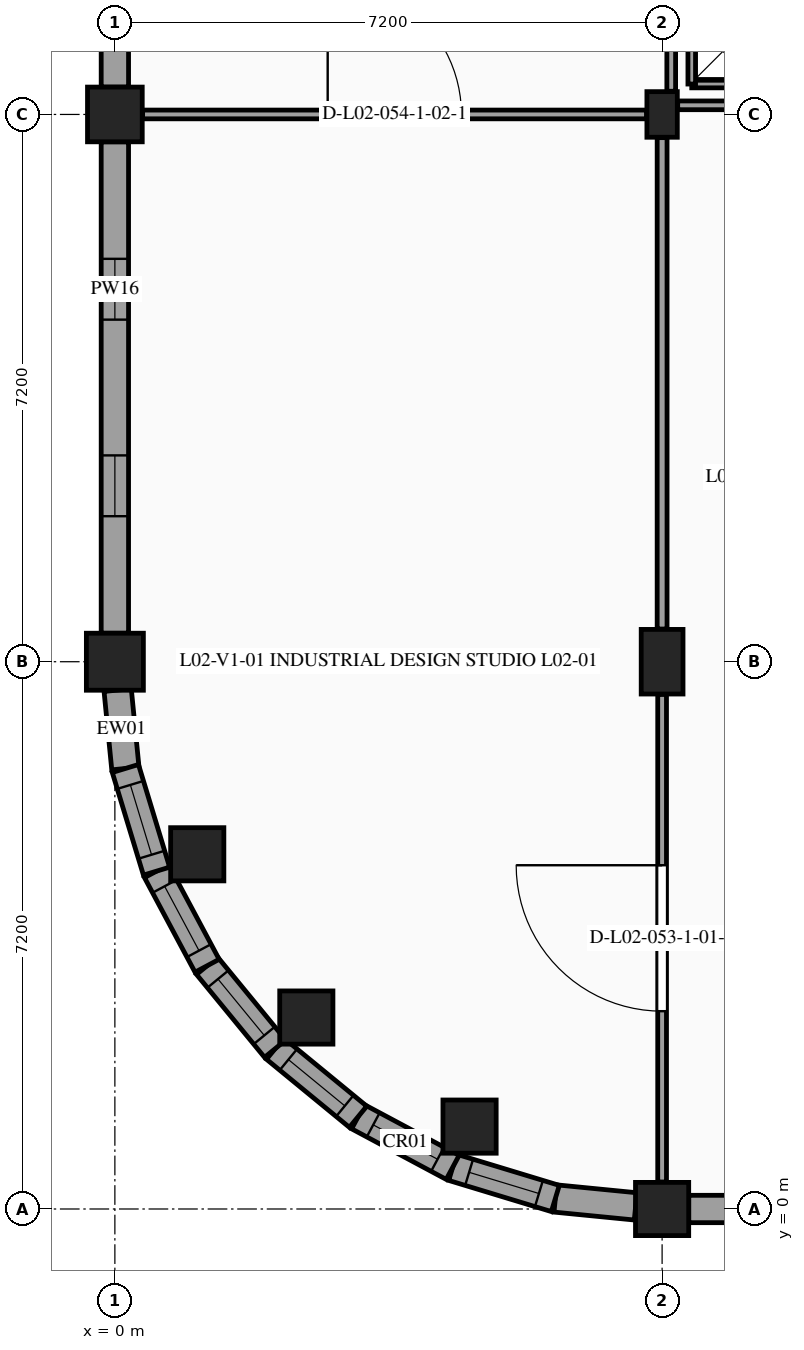
"""IFC4 building model, lengths in metres.
Left out: names, types, materials, properties, quantities, classifications, styles, units other than length and angle.
Written with IfcOpenShell. Run it as: python <this file> out.ifc"""

import sys

from ifc_helpers import new_model, si_unit, direction, frame, frame_2d, origin, origin_2d, place, context, subcontext, project, spatial, rectangle, circle, extrude, element, fill, save


model = new_model("IFC4")
c1 = context("Model", 3, precision=1e-05, world=origin(), true_north=direction((0.0, 1.0)))
c2 = subcontext(c1, "Body", "Model", "MODEL_VIEW")
j1 = project(units=[si_unit("LENGTHUNIT", "METRE"), si_unit("PLANEANGLEUNIT", "RADIAN")], contexts=[c1])
p1 = place(None, origin())
s1 = spatial("IfcSite", under=j1, at=p1, CompositionType="ELEMENT")
p2 = place(p1, origin())
s2 = spatial("IfcBuilding", under=s1, at=p2, CompositionType="ELEMENT")
p3 = place(p2, frame((0.0, 0.0, 9.9)))
s3 = spatial("IfcBuildingStorey", under=s2, at=p3, CompositionType="ELEMENT", Elevation=9.9)
p4 = place(p3, frame((0.0, 7.2, 0.0), z_axis=(0.0, 0.0, 1.0), x_axis=(1.0, 0.0, 0.0)))
e1 = element("IfcColumn", 1, at=p4, inside=s3, PredefinedType="COLUMN", context=c2, shape_type="SweptSolid", body=[
    extrude(rectangle(XDim=0.75, YDim=0.75, at=origin_2d()), origin(), (0.0, 0.0, 1.0), 4.5),
])
p5 = place(p3, frame((0.0, 14.4, 0.0), z_axis=(0.0, 0.0, 1.0), x_axis=(1.0, 0.0, 0.0)))
e2 = element("IfcColumn", 2, at=p5, inside=s3, PredefinedType="COLUMN", context=c2, shape_type="SweptSolid", body=[
    extrude(rectangle(XDim=0.72, YDim=0.72, at=origin_2d()), origin(), (0.0, 0.0, 1.0), 4.5),
])
p6 = place(p3, frame((7.2, 0.0, 0.0), z_axis=(0.0, 0.0, 1.0), x_axis=(1.0, 0.0, 0.0)))
e3 = element("IfcColumn", 3, at=p6, inside=s3, PredefinedType="COLUMN", context=c2, shape_type="SweptSolid", body=[
    extrude(rectangle(XDim=0.7, YDim=0.7, at=origin_2d()), origin(), (0.0, 0.0, 1.0), 4.5),
])
p7 = place(p3, frame((7.2, 7.2, 0.0), z_axis=(0.0, 0.0, 1.0), x_axis=(1.0, 0.0, 0.0)))
e4 = element("IfcColumn", 4, at=p7, inside=s3, PredefinedType="COLUMN", context=c2, shape_type="SweptSolid", body=[
    extrude(rectangle(XDim=0.55, YDim=0.85, at=origin_2d()), origin(), (0.0, 0.0, 1.0), 4.5),
])
p8 = place(p3, frame((7.2, 14.4, 0.0), z_axis=(0.0, 0.0, 1.0), x_axis=(1.0, 0.0, 0.0)))
e5 = element("IfcColumn", 5, at=p8, inside=s3, PredefinedType="PILASTER", context=c2, shape_type="SweptSolid", body=[
    extrude(rectangle(XDim=0.4, YDim=0.6, at=origin_2d()), origin(), (0.0, 0.0, 1.0), 4.5),
])
for number, where, z_axis, x_axis in (
    (6, (1.084, 4.667, 0.0), (0.0, 0.0, 1.0), (1.0, 0.0, 0.0)),
    (7, (2.519, 2.519, 0.0), (0.0, 0.0, 1.0), (1.0, 0.0, 0.0)),
    (8, (4.667, 1.084, 0.0), (0.0, 0.0, 1.0), (1.0, 0.0, 0.0)),
):
    element("IfcColumn", number, at=place(p3, frame(where, z_axis=z_axis, x_axis=x_axis)), inside=s3, PredefinedType="COLUMN", context=c2, shape_type="SweptSolid", body=[
        extrude(circle(Radius=0.35, at=origin_2d()), origin(), (0.0, 0.0, 1.0), 4.5),
    ])
p9 = place(p3, frame((0.138, 5.795, 0.0), z_axis=(0.0, 0.0, 1.0), x_axis=(-0.097987704654, 0.995187625394, 0.0)))
e9 = element("IfcWall", 9, at=p9, inside=s3, PredefinedType="STANDARD", context=c2, shape_type="SweptSolid", body=[
    extrude(rectangle(XDim=1.036, YDim=0.36, at=frame_2d((0.518, 0.0))), origin(), (0.0, 0.0, 1.0), 4.225),
])
p10 = place(p3, frame((0.0, 7.575, 0.0), z_axis=(0.0, 0.0, 1.0), x_axis=(0.0, 1.0, 0.0)))
e10 = element("IfcWall", 10, at=p10, inside=s3, PredefinedType="STANDARD", context=c2, shape_type="SweptSolid", body=[
    extrude(rectangle(XDim=6.465, YDim=0.36, at=frame_2d((3.232, 0.0))), origin(), (0.0, 0.0, 1.0), 3.47),
])
p11 = place(p10, frame((1.54, 0.0, 1.15)))
e11 = element("IfcOpeningElement", 11, at=p11, cuts=e10, PredefinedType="OPENING", context=c2, shape_type="SweptSolid", body=[
    extrude(rectangle(XDim=0.8, YDim=1.5, at=frame_2d((0.4, 0.75))), frame((0.0, 0.19, 0.0), z_axis=(0.0, -1.0, 0.0), x_axis=(1.0, 0.0, 0.0)), (0.0, 0.0, 1.0), 0.38),
])
p12 = place(p10, frame((4.125, 0.0, 1.15)))
e12 = element("IfcOpeningElement", 12, at=p12, cuts=e10, PredefinedType="OPENING", context=c2, shape_type="SweptSolid", body=[
    extrude(rectangle(XDim=0.8, YDim=1.5, at=frame_2d((0.4, 0.75))), frame((0.0, 0.19, 0.0), z_axis=(0.0, -1.0, 0.0), x_axis=(1.0, 0.0, 0.0)), (0.0, 0.0, 1.0), 0.38),
])
p13 = place(p3, frame((0.0, 14.76, 0.0), z_axis=(0.0, 0.0, 1.0), x_axis=(0.0, 1.0, 0.0)))
e13 = element("IfcWall", 13, at=p13, inside=s3, PredefinedType="STANDARD", context=c2, shape_type="SweptSolid", body=[
    extrude(rectangle(XDim=6.49, YDim=0.36, at=frame_2d((3.245, 0.0))), origin(), (0.0, 0.0, 1.0), 3.47),
])
p14 = place(p13, frame((0.972, 0.0, 1.15)))
e14 = element("IfcOpeningElement", 14, at=p14, cuts=e13, PredefinedType="OPENING", context=c2, shape_type="SweptSolid", body=[
    extrude(rectangle(XDim=1.95, YDim=1.4, at=frame_2d((0.975, 0.7))), frame((0.0, 0.19, 0.0), z_axis=(0.0, -1.0, 0.0), x_axis=(1.0, 0.0, 0.0)), (0.0, 0.0, 1.0), 0.38),
])
p15 = place(p13, frame((3.568, 0.0, 1.15)))
e15 = element("IfcOpeningElement", 15, at=p15, cuts=e13, PredefinedType="OPENING", context=c2, shape_type="SweptSolid", body=[
    extrude(rectangle(XDim=1.95, YDim=1.4, at=frame_2d((0.975, 0.7))), frame((0.0, 0.19, 0.0), z_axis=(0.0, -1.0, 0.0), x_axis=(1.0, 0.0, 0.0)), (0.0, 0.0, 1.0), 0.38),
])
p16 = place(p3, frame((14.01, 0.0, 0.0), z_axis=(0.0, 0.0, 1.0), x_axis=(-1.0, 0.0, 0.0)))
e16 = element("IfcWall", 16, at=p16, inside=s3, PredefinedType="STANDARD", context=c2, shape_type="SweptSolid", body=[
    extrude(rectangle(XDim=6.46, YDim=0.36, at=frame_2d((3.23, 0.0))), origin(), (0.0, 0.0, 1.0), 3.47),
])
p17 = place(p16, frame((1.313, 0.0, 1.15)))
e17 = element("IfcOpeningElement", 17, at=p17, cuts=e16, PredefinedType="OPENING", context=c2, shape_type="SweptSolid", body=[
    extrude(rectangle(XDim=1.25, YDim=1.25, at=frame_2d((0.625, 0.625))), frame((0.0, 0.19, 0.0), z_axis=(0.0, -1.0, 0.0), x_axis=(1.0, 0.0, 0.0)), (0.0, 0.0, 1.0), 0.38),
])
p18 = place(p16, frame((3.897, 0.0, 1.15)))
e18 = element("IfcOpeningElement", 18, at=p18, cuts=e16, PredefinedType="OPENING", context=c2, shape_type="SweptSolid", body=[
    extrude(rectangle(XDim=1.25, YDim=1.25, at=frame_2d((0.625, 0.625))), frame((0.0, 0.19, 0.0), z_axis=(0.0, -1.0, 0.0), x_axis=(1.0, 0.0, 0.0)), (0.0, 0.0, 1.0), 0.38),
])
p19 = place(p3, frame((6.852, 0.034, 0.0), z_axis=(0.0, 0.0, 1.0), x_axis=(-0.995188591484, 0.097977892298, 0.0)))
e19 = element("IfcWall", 19, at=p19, inside=s3, PredefinedType="STANDARD", context=c2, shape_type="SweptSolid", body=[
    extrude(rectangle(XDim=1.062, YDim=0.36, at=frame_2d((0.531, 0.0))), origin(), (0.0, 0.0, 1.0), 4.225),
])
p20 = place(p3, frame((5.795, 0.138, 0.0), z_axis=(0.0, 0.0, 1.0), x_axis=(-0.95696037757, 0.290218599957, 0.0)))
e20 = element("IfcWall", 20, at=p20, inside=s3, PredefinedType="STANDARD", context=c2, shape_type="SweptSolid", body=[
    extrude(rectangle(XDim=1.412, YDim=0.36, at=frame_2d((0.706, 0.0))), origin(), (0.0, 0.0, 1.0), 4.225),
])
p21 = place(p20, frame((0.226, 0.0, 1.0)))
e21 = element("IfcOpeningElement", 21, at=p21, cuts=e20, PredefinedType="OPENING", context=c2, shape_type="SweptSolid", body=[
    extrude(rectangle(XDim=0.96, YDim=1.4, at=frame_2d((0.48, 0.7))), frame((0.0, 0.19, 0.0), z_axis=(0.0, -1.0, 0.0), x_axis=(1.0, 0.0, 0.0)), (0.0, 0.0, 1.0), 0.38),
])
p22 = place(p3, frame((4.445, 0.548, 0.0), z_axis=(0.0, 0.0, 1.0), x_axis=(-0.881916788861, 0.471405109778, 0.0)))
e22 = element("IfcWall", 22, at=p22, inside=s3, PredefinedType="STANDARD", context=c2, shape_type="SweptSolid", body=[
    extrude(rectangle(XDim=1.411, YDim=0.36, at=frame_2d((0.706, 0.0))), origin(), (0.0, 0.0, 1.0), 4.225),
])
p23 = place(p22, frame((0.226, 0.0, 1.0)))
e23 = element("IfcOpeningElement", 23, at=p23, cuts=e22, PredefinedType="OPENING", context=c2, shape_type="SweptSolid", body=[
    extrude(rectangle(XDim=0.96, YDim=1.4, at=frame_2d((0.48, 0.7))), frame((0.0, 0.19, 0.0), z_axis=(0.0, -1.0, 0.0), x_axis=(1.0, 0.0, 0.0)), (0.0, 0.0, 1.0), 0.38),
])
p24 = place(p3, frame((3.2, 1.213, 0.0), z_axis=(0.0, 0.0, 1.0), x_axis=(-0.772977670605, 0.634433227965, 0.0)))
e24 = element("IfcWall", 24, at=p24, inside=s3, PredefinedType="STANDARD", context=c2, shape_type="SweptSolid", body=[
    extrude(rectangle(XDim=1.412, YDim=0.36, at=frame_2d((0.706, 0.0))), origin(), (0.0, 0.0, 1.0), 4.225),
])
p25 = place(p24, frame((0.226, 0.0, 1.0)))
e25 = element("IfcOpeningElement", 25, at=p25, cuts=e24, PredefinedType="OPENING", context=c2, shape_type="SweptSolid", body=[
    extrude(rectangle(XDim=0.96, YDim=1.4, at=frame_2d((0.48, 0.7))), frame((0.0, 0.19, 0.0), z_axis=(0.0, -1.0, 0.0), x_axis=(1.0, 0.0, 0.0)), (0.0, 0.0, 1.0), 0.38),
])
p26 = place(p3, frame((2.109, 2.109, 0.0), z_axis=(0.0, 0.0, 1.0), x_axis=(-0.634433227965, 0.772977670605, 0.0)))
e26 = element("IfcWall", 26, at=p26, inside=s3, PredefinedType="STANDARD", context=c2, shape_type="SweptSolid", body=[
    extrude(rectangle(XDim=1.412, YDim=0.36, at=frame_2d((0.706, 0.0))), origin(), (0.0, 0.0, 1.0), 4.225),
])
p27 = place(p26, frame((0.226, 0.0, 1.0)))
e27 = element("IfcOpeningElement", 27, at=p27, cuts=e26, PredefinedType="OPENING", context=c2, shape_type="SweptSolid", body=[
    extrude(rectangle(XDim=0.96, YDim=1.4, at=frame_2d((0.48, 0.7))), frame((0.0, 0.19, 0.0), z_axis=(0.0, -1.0, 0.0), x_axis=(1.0, 0.0, 0.0)), (0.0, 0.0, 1.0), 0.38),
])
p28 = place(p3, frame((1.213, 3.2, 0.0), z_axis=(0.0, 0.0, 1.0), x_axis=(-0.471405109778, 0.881916788861, 0.0)))
e28 = element("IfcWall", 28, at=p28, inside=s3, PredefinedType="STANDARD", context=c2, shape_type="SweptSolid", body=[
    extrude(rectangle(XDim=1.411, YDim=0.36, at=frame_2d((0.706, 0.0))), origin(), (0.0, 0.0, 1.0), 4.225),
])
p29 = place(p28, frame((0.226, 0.0, 1.0)))
e29 = element("IfcOpeningElement", 29, at=p29, cuts=e28, PredefinedType="OPENING", context=c2, shape_type="SweptSolid", body=[
    extrude(rectangle(XDim=0.96, YDim=1.4, at=frame_2d((0.48, 0.7))), frame((0.0, 0.19, 0.0), z_axis=(0.0, -1.0, 0.0), x_axis=(1.0, 0.0, 0.0)), (0.0, 0.0, 1.0), 0.38),
])
p30 = place(p3, frame((0.548, 4.445, 0.0), z_axis=(0.0, 0.0, 1.0), x_axis=(-0.290218599957, 0.95696037757, 0.0)))
e30 = element("IfcWall", 30, at=p30, inside=s3, PredefinedType="STANDARD", context=c2, shape_type="SweptSolid", body=[
    extrude(rectangle(XDim=1.412, YDim=0.36, at=frame_2d((0.706, 0.0))), origin(), (0.0, 0.0, 1.0), 4.225),
])
p31 = place(p30, frame((0.226, 0.0, 1.0)))
e31 = element("IfcOpeningElement", 31, at=p31, cuts=e30, PredefinedType="OPENING", context=c2, shape_type="SweptSolid", body=[
    extrude(rectangle(XDim=0.96, YDim=1.4, at=frame_2d((0.48, 0.7))), frame((0.0, 0.19, 0.0), z_axis=(0.0, -1.0, 0.0), x_axis=(1.0, 0.0, 0.0)), (0.0, 0.0, 1.0), 0.38),
])
p32 = place(p3, frame((7.405, 14.52, 0.0), z_axis=(0.0, 0.0, 1.0), x_axis=(1.0, 0.0, 0.0)))
e32 = element("IfcWall", 32, at=p32, inside=s3, PredefinedType="PARTITIONING", context=c2, shape_type="SweptSolid", body=[
    extrude(rectangle(XDim=6.63, YDim=0.115, at=frame_2d((3.315, 0.0))), origin(), (0.0, 0.0, 1.0), 3.5),
])
p33 = place(p3, frame((7.32, 14.705, 0.0), z_axis=(0.0, 0.0, 1.0), x_axis=(0.0, 1.0, 0.0)))
e33 = element("IfcWall", 33, at=p33, inside=s3, PredefinedType="PARTITIONING", context=c2, shape_type="SweptSolid", body=[
    extrude(rectangle(XDim=6.5, YDim=0.115, at=frame_2d((3.25, 0.0))), origin(), (0.0, 0.0, 1.0), 3.53),
])
p34 = place(p3, frame((7.59, 14.8, 0.0), z_axis=(0.0, 0.0, 1.0), x_axis=(1.0, 0.0, 0.0)))
e34 = element("IfcWall", 34, at=p34, inside=s3, PredefinedType="PARTITIONING", context=c2, shape_type="SweptSolid", body=[
    extrude(rectangle(XDim=0.82, YDim=0.1, at=frame_2d((0.41, 0.0))), origin(), (0.0, 0.0, 1.0), 4.225),
])
p35 = place(p3, frame((7.59, 15.66, 0.0), z_axis=(0.0, 0.0, 1.0), x_axis=(0.0, -1.0, 0.0)))
e35 = element("IfcWall", 35, at=p35, inside=s3, PredefinedType="PARTITIONING", context=c2, shape_type="SweptSolid", body=[
    extrude(rectangle(XDim=0.86, YDim=0.1, at=frame_2d((0.43, 0.0))), origin(), (0.0, 0.0, 1.0), 4.225),
])
p36 = place(p3, frame((7.2, 0.355, 0.0), z_axis=(0.0, 0.0, 1.0), x_axis=(0.0, 1.0, 0.0)))
e36 = element("IfcWall", 36, at=p36, inside=s3, PredefinedType="PARTITIONING", context=c2, shape_type="SweptSolid", body=[
    extrude(rectangle(XDim=6.415, YDim=0.115, at=frame_2d((3.208, 0.0))), origin(), (0.0, 0.0, 1.0), 3.54),
])
p37 = place(p36, frame((2.248, 0.0, 0.0)))
e37 = element("IfcOpeningElement", 37, at=p37, cuts=e36, PredefinedType="OPENING", context=c2, shape_type="SweptSolid", body=[
    extrude(rectangle(XDim=1.92, YDim=2.35, at=frame_2d((0.96, 1.175))), frame((0.0, 0.067, 0.0), z_axis=(0.0, -1.0, 0.0), x_axis=(1.0, 0.0, 0.0)), (0.0, 0.0, 1.0), 0.135),
])
p38 = place(p3, frame((7.2, 7.63, 0.0), z_axis=(0.0, 0.0, 1.0), x_axis=(0.0, 1.0, 0.0)))
e38 = element("IfcWall", 38, at=p38, inside=s3, PredefinedType="PARTITIONING", context=c2, shape_type="SweptSolid", body=[
    extrude(rectangle(XDim=6.465, YDim=0.13, at=frame_2d((3.232, 0.0))), origin(), (0.0, 0.0, 1.0), 3.535),
])
p39 = place(p3, frame((0.365, 14.4, 0.0), z_axis=(0.0, 0.0, 1.0), x_axis=(1.0, 0.0, 0.0)))
e39 = element("IfcWall", 39, at=p39, inside=s3, PredefinedType="PARTITIONING", context=c2, shape_type="SweptSolid", body=[
    extrude(rectangle(XDim=6.63, YDim=0.115, at=frame_2d((3.315, 0.0))), origin(), (0.0, 0.0, 1.0), 3.485),
])
p40 = place(p39, frame((2.435, 0.0, 0.0)))
e40 = element("IfcOpeningElement", 40, at=p40, cuts=e39, PredefinedType="OPENING", context=c2, shape_type="SweptSolid", body=[
    extrude(rectangle(XDim=1.76, YDim=2.3, at=frame_2d((0.88, 1.15))), frame((0.0, 0.067, 0.0), z_axis=(0.0, -1.0, 0.0), x_axis=(1.0, 0.0, 0.0)), (0.0, 0.0, 1.0), 0.135),
])
p41 = place(p11, origin())
e41 = element("IfcWindow", 41, at=p41, inside=s3, PartitioningType="SINGLE_PANEL", PredefinedType="WINDOW", context=c2, shape_type="SweptSolid", body=[
    extrude(rectangle(XDim=0.8, YDim=1.5, at=frame_2d((0.4, 0.75))), frame((0.0, -0.08, 0.0), z_axis=(0.0, -1.0, 0.0), x_axis=(1.0, 0.0, 0.0)), (0.0, 0.0, 1.0), 0.06),
])
fill(e11, e41)
p42 = place(p12, origin())
e42 = element("IfcWindow", 42, at=p42, inside=s3, PartitioningType="SINGLE_PANEL", PredefinedType="WINDOW", context=c2, shape_type="SweptSolid", body=[
    extrude(rectangle(XDim=0.8, YDim=1.5, at=frame_2d((0.4, 0.75))), frame((0.0, -0.08, 0.0), z_axis=(0.0, -1.0, 0.0), x_axis=(1.0, 0.0, 0.0)), (0.0, 0.0, 1.0), 0.06),
])
fill(e12, e42)
p43 = place(p21, origin())
e43 = element("IfcWindow", 43, at=p43, inside=s3, PartitioningType="SINGLE_PANEL", PredefinedType="WINDOW", context=c2, shape_type="SweptSolid", body=[
    extrude(rectangle(XDim=0.96, YDim=1.4, at=frame_2d((0.48, 0.7))), frame((0.0, -0.01, 0.0), z_axis=(0.0, -1.0, 0.0), x_axis=(1.0, 0.0, 0.0)), (0.0, 0.0, 1.0), 0.06),
])
fill(e21, e43)
p44 = place(p23, origin())
e44 = element("IfcWindow", 44, at=p44, inside=s3, PartitioningType="SINGLE_PANEL", PredefinedType="WINDOW", context=c2, shape_type="SweptSolid", body=[
    extrude(rectangle(XDim=0.96, YDim=1.4, at=frame_2d((0.48, 0.7))), frame((0.0, -0.01, 0.0), z_axis=(0.0, -1.0, 0.0), x_axis=(1.0, 0.0, 0.0)), (0.0, 0.0, 1.0), 0.06),
])
fill(e23, e44)
p45 = place(p25, origin())
e45 = element("IfcWindow", 45, at=p45, inside=s3, PartitioningType="SINGLE_PANEL", PredefinedType="WINDOW", context=c2, shape_type="SweptSolid", body=[
    extrude(rectangle(XDim=0.96, YDim=1.4, at=frame_2d((0.48, 0.7))), frame((0.0, -0.01, 0.0), z_axis=(0.0, -1.0, 0.0), x_axis=(1.0, 0.0, 0.0)), (0.0, 0.0, 1.0), 0.06),
])
fill(e25, e45)
p46 = place(p27, origin())
e46 = element("IfcWindow", 46, at=p46, inside=s3, PartitioningType="SINGLE_PANEL", PredefinedType="WINDOW", context=c2, shape_type="SweptSolid", body=[
    extrude(rectangle(XDim=0.96, YDim=1.4, at=frame_2d((0.48, 0.7))), frame((0.0, -0.01, 0.0), z_axis=(0.0, -1.0, 0.0), x_axis=(1.0, 0.0, 0.0)), (0.0, 0.0, 1.0), 0.06),
])
fill(e27, e46)
p47 = place(p29, origin())
e47 = element("IfcWindow", 47, at=p47, inside=s3, PartitioningType="SINGLE_PANEL", PredefinedType="WINDOW", context=c2, shape_type="SweptSolid", body=[
    extrude(rectangle(XDim=0.96, YDim=1.4, at=frame_2d((0.48, 0.7))), frame((0.0, -0.01, 0.0), z_axis=(0.0, -1.0, 0.0), x_axis=(1.0, 0.0, 0.0)), (0.0, 0.0, 1.0), 0.06),
])
fill(e29, e47)
p48 = place(p31, origin())
e48 = element("IfcWindow", 48, at=p48, inside=s3, PartitioningType="SINGLE_PANEL", PredefinedType="WINDOW", context=c2, shape_type="SweptSolid", body=[
    extrude(rectangle(XDim=0.96, YDim=1.4, at=frame_2d((0.48, 0.7))), frame((0.0, -0.01, 0.0), z_axis=(0.0, -1.0, 0.0), x_axis=(1.0, 0.0, 0.0)), (0.0, 0.0, 1.0), 0.06),
])
fill(e31, e48)
p49 = place(p37, origin())
e49 = element("IfcDoor", 49, at=p49, inside=s3, OperationType="SINGLE_SWING_RIGHT", PredefinedType="DOOR", context=c2, shape_type="SweptSolid", body=[
    extrude(rectangle(XDim=1.92, YDim=2.35, at=frame_2d((0.96, 1.175))), frame((0.0, 0.025, 0.0), z_axis=(0.0, -1.0, 0.0), x_axis=(1.0, 0.0, 0.0)), (0.0, 0.0, 1.0), 0.05),
])
fill(e37, e49)
p50 = place(p40, origin())
e50 = element("IfcDoor", 50, at=p50, inside=s3, OperationType="SINGLE_SWING_LEFT", PredefinedType="DOOR", context=c2, shape_type="SweptSolid", body=[
    extrude(rectangle(XDim=1.76, YDim=2.3, at=frame_2d((0.88, 1.15))), frame((0.0, 0.025, 0.0), z_axis=(0.0, -1.0, 0.0), x_axis=(1.0, 0.0, 0.0)), (0.0, 0.0, 1.0), 0.05),
])
fill(e40, e50)
save(model, sys.argv[1])
